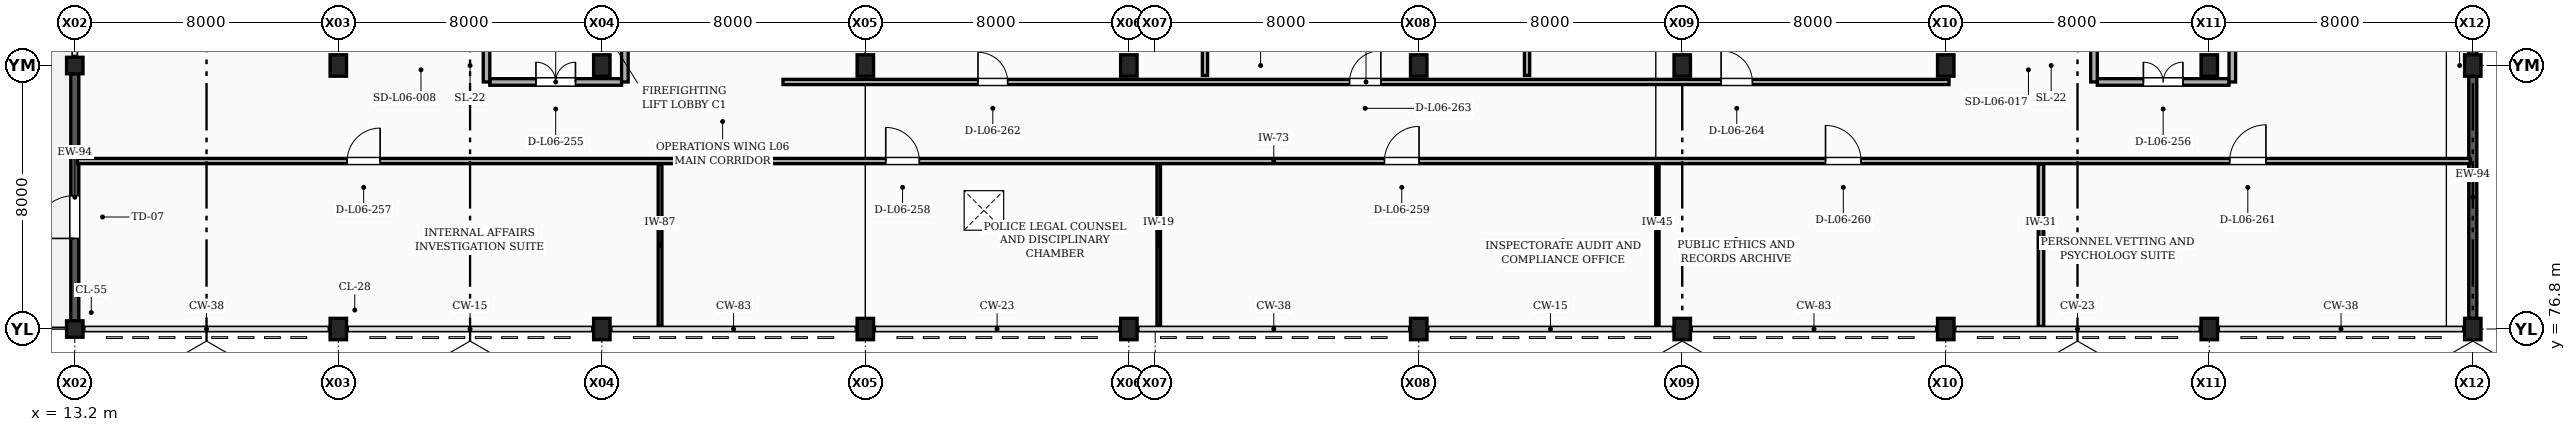
"""IFC4 building model, lengths in metres.
Left out: names, types, materials, properties, quantities, classifications, styles, units other than length and angle.
Written with IfcOpenShell. Run it as: python <this file> out.ifc"""

import sys

from ifc_helpers import new_model, si_unit, direction, frame, frame_2d, origin, origin_2d, place, context, subcontext, project, spatial, rectangle, extrude, element, fill, save


model = new_model("IFC4")
c1 = context("Model", 3, precision=1e-05, world=origin(), true_north=direction((0.0, 1.0)))
c2 = subcontext(c1, "Body", "Model", "MODEL_VIEW")
j1 = project(units=[si_unit("LENGTHUNIT", "METRE"), si_unit("PLANEANGLEUNIT", "RADIAN")], contexts=[c1])
p1 = place(None, origin())
s1 = spatial("IfcSite", under=j1, at=p1, CompositionType="ELEMENT")
p2 = place(p1, origin())
s2 = spatial("IfcBuilding", under=s1, at=p2, CompositionType="ELEMENT")
p3 = place(p2, frame((0.0, 0.0, 25.8)))
s3 = spatial("IfcBuildingStorey", under=s2, at=p3, CompositionType="ELEMENT", Elevation=25.8)
for number, where, z_axis, x_axis in (
    (1, (13.2, 76.8, 0.0), (0.0, 0.0, 1.0), (1.0, 0.0, 0.0)),
    (2, (13.2, 84.8, 0.0), (0.0, 0.0, 1.0), (1.0, 0.0, 0.0)),
):
    element("IfcColumn", number, at=place(p3, frame(where, z_axis=z_axis, x_axis=x_axis)), inside=s3, PredefinedType="COLUMN", context=c2, shape_type="SweptSolid", body=[
        extrude(rectangle(XDim=0.5, YDim=0.5, at=origin_2d()), origin(), (0.0, 0.0, 1.0), 3.9),
    ])
for number, where, z_axis, x_axis in (
    (3, (21.2, 76.8, 0.0), (0.0, 0.0, 1.0), (1.0, 0.0, 0.0)),
    (4, (21.2, 84.8, 0.0), (0.0, 0.0, 1.0), (1.0, 0.0, 0.0)),
    (5, (29.2, 76.8, 0.0), (0.0, 0.0, 1.0), (1.0, 0.0, 0.0)),
    (6, (29.2, 84.8, 0.0), (0.0, 0.0, 1.0), (1.0, 0.0, 0.0)),
    (7, (37.2, 76.8, 0.0), (0.0, 0.0, 1.0), (1.0, 0.0, 0.0)),
    (8, (37.2, 84.8, 0.0), (0.0, 0.0, 1.0), (1.0, 0.0, 0.0)),
    (9, (45.2, 76.8, 0.0), (0.0, 0.0, 1.0), (1.0, 0.0, 0.0)),
    (10, (45.2, 84.8, 0.0), (0.0, 0.0, 1.0), (1.0, 0.0, 0.0)),
    (11, (54.0, 76.8, 0.0), (0.0, 0.0, 1.0), (1.0, 0.0, 0.0)),
    (12, (54.0, 84.8, 0.0), (0.0, 0.0, 1.0), (1.0, 0.0, 0.0)),
    (13, (62.0, 76.8, 0.0), (0.0, 0.0, 1.0), (1.0, 0.0, 0.0)),
    (14, (62.0, 84.8, 0.0), (0.0, 0.0, 1.0), (1.0, 0.0, 0.0)),
    (15, (70.0, 76.8, 0.0), (0.0, 0.0, 1.0), (1.0, 0.0, 0.0)),
    (16, (70.0, 84.8, 0.0), (0.0, 0.0, 1.0), (1.0, 0.0, 0.0)),
    (17, (78.0, 76.8, 0.0), (0.0, 0.0, 1.0), (1.0, 0.0, 0.0)),
    (18, (78.0, 84.8, 0.0), (0.0, 0.0, 1.0), (1.0, 0.0, 0.0)),
    (19, (86.0, 76.8, 0.0), (0.0, 0.0, 1.0), (1.0, 0.0, 0.0)),
    (20, (86.0, 84.8, 0.0), (0.0, 0.0, 1.0), (1.0, 0.0, 0.0)),
):
    element("IfcColumn", number, at=place(p3, frame(where, z_axis=z_axis, x_axis=x_axis)), inside=s3, PredefinedType="COLUMN", context=c2, shape_type="SweptSolid", body=[
        extrude(rectangle(XDim=0.5, YDim=0.65, at=origin_2d()), origin(), (0.0, 0.0, 1.0), 3.9),
    ])
p4 = place(p3, frame((86.0, 77.125, 0.0), z_axis=(0.0, 0.0, 1.0), x_axis=(0.0, 1.0, 0.0)))
e21 = element("IfcWall", 21, at=p4, inside=s3, PredefinedType="SOLIDWALL", context=c2, shape_type="SweptSolid", body=[
    extrude(rectangle(XDim=7.35, YDim=0.245, at=frame_2d((3.675, 0.0))), origin(), (0.0, 0.0, 1.0), 3.01),
])
p5 = place(p3, frame((86.0, 85.125, 0.0), z_axis=(0.0, 0.0, 1.0), x_axis=(0.0, 1.0, 0.0)))
e22 = element("IfcWall", 22, at=p5, inside=s3, PredefinedType="SOLIDWALL", context=c2, shape_type="SweptSolid", body=[
    extrude(rectangle(XDim=7.35, YDim=0.245, at=frame_2d((3.675, 0.0))), origin(), (0.0, 0.0, 1.0), 3.01),
])
p6 = place(p5, frame((2.475, 0.0, 0.9)))
e23 = element("IfcOpeningElement", 23, at=p6, cuts=e22, PredefinedType="OPENING", context=c2, shape_type="SweptSolid", body=[
    extrude(rectangle(XDim=2.4, YDim=1.5, at=frame_2d((1.2, 0.75))), frame((0.0, 0.133, 0.0), z_axis=(0.0, -1.0, 0.0), x_axis=(1.0, 0.0, 0.0)), (0.0, 0.0, 1.0), 0.265),
])
p7 = place(p3, frame((13.2, 84.55, 0.0), z_axis=(0.0, 0.0, 1.0), x_axis=(0.0, -1.0, 0.0)))
e24 = element("IfcWall", 24, at=p7, inside=s3, PredefinedType="SOLIDWALL", context=c2, shape_type="SweptSolid", body=[
    extrude(rectangle(XDim=7.5, YDim=0.245, at=frame_2d((3.75, 0.0))), origin(), (0.0, 0.0, 1.0), 3.01),
])
p8 = place(p7, frame((3.7, 0.0, 0.0)))
e25 = element("IfcOpeningElement", 25, at=p8, cuts=e24, PredefinedType="OPENING", context=c2, shape_type="SweptSolid", body=[
    extrude(rectangle(XDim=1.3, YDim=2.2, at=frame_2d((0.65, 1.1))), frame((0.0, 0.133, 0.0), z_axis=(0.0, -1.0, 0.0), x_axis=(1.0, 0.0, 0.0)), (0.0, 0.0, 1.0), 0.265),
])
p9 = place(p3, frame((25.8, 84.3, 0.0), z_axis=(0.0, 0.0, 1.0), x_axis=(1.0, 0.0, 0.0)))
e26 = element("IfcWall", 26, at=p9, inside=s3, PredefinedType="PARTITIONING", context=c2, shape_type="SweptSolid", body=[
    extrude(rectangle(XDim=4.0, YDim=0.2, at=frame_2d((2.0, 0.0))), origin(), (0.0, 0.0, 1.0), 2.895),
])
p10 = place(p9, frame((1.4, 0.0, 0.0)))
e27 = element("IfcOpeningElement", 27, at=p10, cuts=e26, PredefinedType="OPENING", context=c2, shape_type="SweptSolid", body=[
    extrude(rectangle(XDim=1.2, YDim=2.15, at=frame_2d((0.6, 1.075))), frame((0.0, 0.11, 0.0), z_axis=(0.0, -1.0, 0.0), x_axis=(1.0, 0.0, 0.0)), (0.0, 0.0, 1.0), 0.22),
])
p11 = place(p3, frame((25.7, 84.3, 0.0), z_axis=(0.0, 0.0, 1.0), x_axis=(0.0, 1.0, 0.0)))
e28 = element("IfcWall", 28, at=p11, inside=s3, PredefinedType="PARTITIONING", context=c2, shape_type="SweptSolid", body=[
    extrude(rectangle(XDim=4.8, YDim=0.2, at=frame_2d((2.4, 0.0))), origin(), (0.0, 0.0, 1.0), 3.045),
])
p12 = place(p3, frame((29.9, 84.3, 0.0), z_axis=(0.0, 0.0, 1.0), x_axis=(0.0, 1.0, 0.0)))
e29 = element("IfcWall", 29, at=p12, inside=s3, PredefinedType="PARTITIONING", context=c2, shape_type="SweptSolid", body=[
    extrude(rectangle(XDim=4.8, YDim=0.2, at=frame_2d((2.4, 0.0))), origin(), (0.0, 0.0, 1.0), 3.095),
])
p13 = place(p3, frame((74.6, 84.3, 0.0), z_axis=(0.0, 0.0, 1.0), x_axis=(1.0, 0.0, 0.0)))
e30 = element("IfcWall", 30, at=p13, inside=s3, PredefinedType="PARTITIONING", context=c2, shape_type="SweptSolid", body=[
    extrude(rectangle(XDim=4.0, YDim=0.2, at=frame_2d((2.0, 0.0))), origin(), (0.0, 0.0, 1.0), 2.895),
])
p14 = place(p13, frame((1.4, 0.0, 0.0)))
e31 = element("IfcOpeningElement", 31, at=p14, cuts=e30, PredefinedType="OPENING", context=c2, shape_type="SweptSolid", body=[
    extrude(rectangle(XDim=1.2, YDim=2.15, at=frame_2d((0.6, 1.075))), frame((0.0, 0.11, 0.0), z_axis=(0.0, -1.0, 0.0), x_axis=(1.0, 0.0, 0.0)), (0.0, 0.0, 1.0), 0.22),
])
p15 = place(p3, frame((74.5, 84.3, 0.0), z_axis=(0.0, 0.0, 1.0), x_axis=(0.0, 1.0, 0.0)))
e32 = element("IfcWall", 32, at=p15, inside=s3, PredefinedType="PARTITIONING", context=c2, shape_type="SweptSolid", body=[
    extrude(rectangle(XDim=4.8, YDim=0.2, at=frame_2d((2.4, 0.0))), origin(), (0.0, 0.0, 1.0), 3.045),
])
p16 = place(p3, frame((78.7, 84.3, 0.0), z_axis=(0.0, 0.0, 1.0), x_axis=(0.0, 1.0, 0.0)))
e33 = element("IfcWall", 33, at=p16, inside=s3, PredefinedType="PARTITIONING", context=c2, shape_type="SweptSolid", body=[
    extrude(rectangle(XDim=4.8, YDim=0.2, at=frame_2d((2.4, 0.0))), origin(), (0.0, 0.0, 1.0), 3.095),
])
p17 = place(p3, frame((30.968, 76.88, 0.0), z_axis=(0.0, 0.0, 1.0), x_axis=(0.0, 1.0, 0.0)))
e34 = element("IfcWall", 34, at=p17, inside=s3, PredefinedType="PARTITIONING", context=c2, shape_type="SweptSolid", body=[
    extrude(rectangle(XDim=4.92, YDim=0.115, at=frame_2d((2.46, 0.0))), origin(), (0.0, 0.0, 1.0), 3.66),
])
p18 = place(p3, frame((46.107, 76.88, 0.0), z_axis=(0.0, 0.0, 1.0), x_axis=(0.0, 1.0, 0.0)))
e35 = element("IfcWall", 35, at=p18, inside=s3, PredefinedType="PARTITIONING", context=c2, shape_type="SweptSolid", body=[
    extrude(rectangle(XDim=4.92, YDim=0.108, at=frame_2d((2.46, 0.0))), origin(), (0.0, 0.0, 1.0), 3.66),
])
p19 = place(p3, frame((61.246, 76.88, 0.0), z_axis=(0.0, 0.0, 1.0), x_axis=(0.0, 1.0, 0.0)))
e36 = element("IfcWall", 36, at=p19, inside=s3, PredefinedType="PARTITIONING", context=c2, shape_type="SweptSolid", body=[
    extrude(rectangle(XDim=4.92, YDim=0.1, at=frame_2d((2.46, 0.0))), origin(), (0.0, 0.0, 1.0), 3.66),
])
p20 = place(p3, frame((72.891, 76.88, 0.0), z_axis=(0.0, 0.0, 1.0), x_axis=(0.0, 1.0, 0.0)))
e37 = element("IfcWall", 37, at=p20, inside=s3, PredefinedType="PARTITIONING", context=c2, shape_type="SweptSolid", body=[
    extrude(rectangle(XDim=4.92, YDim=0.168, at=frame_2d((2.46, 0.0))), origin(), (0.0, 0.0, 1.0), 2.995),
])
p21 = place(p3, frame((13.28, 81.9, 0.0), z_axis=(0.0, 0.0, 1.0), x_axis=(1.0, 0.0, 0.0)))
e38 = element("IfcWall", 38, at=p21, inside=s3, PredefinedType="PARTITIONING", context=c2, shape_type="SweptSolid", body=[
    extrude(rectangle(XDim=72.64, YDim=0.16, at=frame_2d((36.32, 0.0))), origin(), (0.0, 0.0, 1.0), 2.895),
])
p22 = place(p21, frame((8.19, 0.0, 0.0)))
e39 = element("IfcOpeningElement", 39, at=p22, cuts=e38, PredefinedType="OPENING", context=c2, shape_type="SweptSolid", body=[
    extrude(rectangle(XDim=1.0, YDim=2.1, at=frame_2d((0.5, 1.05))), frame((0.0, 0.09, 0.0), z_axis=(0.0, -1.0, 0.0), x_axis=(1.0, 0.0, 0.0)), (0.0, 0.0, 1.0), 0.18),
])
p23 = place(p21, frame((24.54, 0.0, 0.0)))
e40 = element("IfcOpeningElement", 40, at=p23, cuts=e38, PredefinedType="OPENING", context=c2, shape_type="SweptSolid", body=[
    extrude(rectangle(XDim=1.02, YDim=2.12, at=frame_2d((0.51, 1.06))), frame((0.0, 0.09, 0.0), z_axis=(0.0, -1.0, 0.0), x_axis=(1.0, 0.0, 0.0)), (0.0, 0.0, 1.0), 0.18),
])
p24 = place(p21, frame((39.68, 0.0, 0.0)))
e41 = element("IfcOpeningElement", 41, at=p24, cuts=e38, PredefinedType="OPENING", context=c2, shape_type="SweptSolid", body=[
    extrude(rectangle(XDim=1.05, YDim=2.1, at=frame_2d((0.525, 1.05))), frame((0.0, 0.09, 0.0), z_axis=(0.0, -1.0, 0.0), x_axis=(1.0, 0.0, 0.0)), (0.0, 0.0, 1.0), 0.18),
])
p25 = place(p21, frame((53.07, 0.0, 0.0)))
e42 = element("IfcOpeningElement", 42, at=p25, cuts=e38, PredefinedType="OPENING", context=c2, shape_type="SweptSolid", body=[
    extrude(rectangle(XDim=1.08, YDim=2.14, at=frame_2d((0.54, 1.07))), frame((0.0, 0.09, 0.0), z_axis=(0.0, -1.0, 0.0), x_axis=(1.0, 0.0, 0.0)), (0.0, 0.0, 1.0), 0.18),
])
p26 = place(p21, frame((65.34, 0.0, 0.0)))
e43 = element("IfcOpeningElement", 43, at=p26, cuts=e38, PredefinedType="OPENING", context=c2, shape_type="SweptSolid", body=[
    extrude(rectangle(XDim=1.1, YDim=2.1, at=frame_2d((0.55, 1.05))), frame((0.0, 0.09, 0.0), z_axis=(0.0, -1.0, 0.0), x_axis=(1.0, 0.0, 0.0)), (0.0, 0.0, 1.0), 0.18),
])
p27 = place(p3, frame((47.511, 84.5, 0.0), z_axis=(0.0, 0.0, 1.0), x_axis=(0.0, 1.0, 0.0)))
e44 = element("IfcWall", 44, at=p27, inside=s3, PredefinedType="PARTITIONING", context=c2, shape_type="SweptSolid", body=[
    extrude(rectangle(XDim=8.22, YDim=0.16, at=frame_2d((4.11, 0.0))), origin(), (0.0, 0.0, 1.0), 2.895),
])
p28 = place(p3, frame((57.289, 84.5, 0.0), z_axis=(0.0, 0.0, 1.0), x_axis=(0.0, 1.0, 0.0)))
e45 = element("IfcWall", 45, at=p28, inside=s3, PredefinedType="PARTITIONING", context=c2, shape_type="SweptSolid", body=[
    extrude(rectangle(XDim=8.22, YDim=0.16, at=frame_2d((4.11, 0.0))), origin(), (0.0, 0.0, 1.0), 2.945),
])
p29 = place(p3, frame((34.7, 84.3, 0.0), z_axis=(0.0, 0.0, 1.0), x_axis=(1.0, 0.0, 0.0)))
e46 = element("IfcWall", 46, at=p29, inside=s3, PredefinedType="PARTITIONING", context=c2, shape_type="SweptSolid", body=[
    extrude(rectangle(XDim=35.4, YDim=0.16, at=frame_2d((17.7, 0.0))), origin(), (0.0, 0.0, 1.0), 2.895),
])
p30 = place(p29, frame((5.92, 0.0, 0.0)))
e47 = element("IfcOpeningElement", 47, at=p30, cuts=e46, PredefinedType="OPENING", context=c2, shape_type="SweptSolid", body=[
    extrude(rectangle(XDim=0.9, YDim=2.1, at=frame_2d((0.45, 1.05))), frame((0.0, 0.09, 0.0), z_axis=(0.0, -1.0, 0.0), x_axis=(1.0, 0.0, 0.0)), (0.0, 0.0, 1.0), 0.18),
])
p31 = place(p29, frame((17.2, 0.0, 0.0)))
e48 = element("IfcOpeningElement", 48, at=p31, cuts=e46, PredefinedType="OPENING", context=c2, shape_type="SweptSolid", body=[
    extrude(rectangle(XDim=0.95, YDim=2.15, at=frame_2d((0.475, 1.075))), frame((0.0, 0.09, 0.0), z_axis=(0.0, -1.0, 0.0), x_axis=(1.0, 0.0, 0.0)), (0.0, 0.0, 1.0), 0.18),
])
p32 = place(p29, frame((28.48, 0.0, 0.0)))
e49 = element("IfcOpeningElement", 49, at=p32, cuts=e46, PredefinedType="OPENING", context=c2, shape_type="SweptSolid", body=[
    extrude(rectangle(XDim=0.95, YDim=2.1, at=frame_2d((0.475, 1.05))), frame((0.0, 0.09, 0.0), z_axis=(0.0, -1.0, 0.0), x_axis=(1.0, 0.0, 0.0)), (0.0, 0.0, 1.0), 0.18),
])
p33 = place(p8, frame((1.3, 0.0, 0.0), z_axis=(0.0, 0.0, 1.0), x_axis=(-1.0, 0.0, 0.0)))
e50 = element("IfcDoor", 50, at=p33, inside=s3, OperationType="SINGLE_SWING_LEFT", PredefinedType="DOOR", context=c2, shape_type="SweptSolid", body=[
    extrude(rectangle(XDim=1.3, YDim=2.2, at=frame_2d((0.65, 1.1))), frame((0.0, 0.025, 0.0), z_axis=(0.0, -1.0, 0.0), x_axis=(1.0, 0.0, 0.0)), (0.0, 0.0, 1.0), 0.05),
])
fill(e25, e50)
p34 = place(p10, origin())
e51 = element("IfcDoor", 51, at=p34, inside=s3, OperationType="DOUBLE_DOOR_SINGLE_SWING", PredefinedType="DOOR", context=c2, shape_type="SweptSolid", body=[
    extrude(rectangle(XDim=1.2, YDim=2.15, at=frame_2d((0.6, 1.075))), frame((0.0, 0.025, 0.0), z_axis=(0.0, -1.0, 0.0), x_axis=(1.0, 0.0, 0.0)), (0.0, 0.0, 1.0), 0.05),
])
fill(e27, e51)
p35 = place(p14, origin())
e52 = element("IfcDoor", 52, at=p35, inside=s3, OperationType="DOUBLE_DOOR_SINGLE_SWING", PredefinedType="DOOR", context=c2, shape_type="SweptSolid", body=[
    extrude(rectangle(XDim=1.2, YDim=2.15, at=frame_2d((0.6, 1.075))), frame((0.0, 0.025, 0.0), z_axis=(0.0, -1.0, 0.0), x_axis=(1.0, 0.0, 0.0)), (0.0, 0.0, 1.0), 0.05),
])
fill(e31, e52)
p36 = place(p22, origin())
e53 = element("IfcDoor", 53, at=p36, inside=s3, OperationType="SINGLE_SWING_RIGHT", PredefinedType="DOOR", context=c2, shape_type="SweptSolid", body=[
    extrude(rectangle(XDim=1.0, YDim=2.1, at=frame_2d((0.5, 1.05))), frame((0.0, 0.025, 0.0), z_axis=(0.0, -1.0, 0.0), x_axis=(1.0, 0.0, 0.0)), (0.0, 0.0, 1.0), 0.05),
])
fill(e39, e53)
p37 = place(p23, origin())
e54 = element("IfcDoor", 54, at=p37, inside=s3, OperationType="SINGLE_SWING_LEFT", PredefinedType="DOOR", context=c2, shape_type="SweptSolid", body=[
    extrude(rectangle(XDim=1.02, YDim=2.12, at=frame_2d((0.51, 1.06))), frame((0.0, 0.025, 0.0), z_axis=(0.0, -1.0, 0.0), x_axis=(1.0, 0.0, 0.0)), (0.0, 0.0, 1.0), 0.05),
])
fill(e40, e54)
p38 = place(p24, origin())
e55 = element("IfcDoor", 55, at=p38, inside=s3, OperationType="SINGLE_SWING_RIGHT", PredefinedType="DOOR", context=c2, shape_type="SweptSolid", body=[
    extrude(rectangle(XDim=1.05, YDim=2.1, at=frame_2d((0.525, 1.05))), frame((0.0, 0.025, 0.0), z_axis=(0.0, -1.0, 0.0), x_axis=(1.0, 0.0, 0.0)), (0.0, 0.0, 1.0), 0.05),
])
fill(e41, e55)
p39 = place(p25, origin())
e56 = element("IfcDoor", 56, at=p39, inside=s3, OperationType="SINGLE_SWING_LEFT", PredefinedType="DOOR", context=c2, shape_type="SweptSolid", body=[
    extrude(rectangle(XDim=1.08, YDim=2.14, at=frame_2d((0.54, 1.07))), frame((0.0, 0.025, 0.0), z_axis=(0.0, -1.0, 0.0), x_axis=(1.0, 0.0, 0.0)), (0.0, 0.0, 1.0), 0.05),
])
fill(e42, e56)
p40 = place(p26, origin())
e57 = element("IfcDoor", 57, at=p40, inside=s3, OperationType="SINGLE_SWING_RIGHT", PredefinedType="DOOR", context=c2, shape_type="SweptSolid", body=[
    extrude(rectangle(XDim=1.1, YDim=2.1, at=frame_2d((0.55, 1.05))), frame((0.0, 0.025, 0.0), z_axis=(0.0, -1.0, 0.0), x_axis=(1.0, 0.0, 0.0)), (0.0, 0.0, 1.0), 0.05),
])
fill(e43, e57)
p41 = place(p30, origin())
e58 = element("IfcDoor", 58, at=p41, inside=s3, OperationType="SINGLE_SWING_LEFT", PredefinedType="DOOR", context=c2, shape_type="SweptSolid", body=[
    extrude(rectangle(XDim=0.9, YDim=2.1, at=frame_2d((0.45, 1.05))), frame((0.0, 0.025, 0.0), z_axis=(0.0, -1.0, 0.0), x_axis=(1.0, 0.0, 0.0)), (0.0, 0.0, 1.0), 0.05),
])
fill(e47, e58)
p42 = place(p31, origin())
e59 = element("IfcDoor", 59, at=p42, inside=s3, OperationType="SINGLE_SWING_RIGHT", PredefinedType="DOOR", context=c2, shape_type="SweptSolid", body=[
    extrude(rectangle(XDim=0.95, YDim=2.15, at=frame_2d((0.475, 1.075))), frame((0.0, 0.025, 0.0), z_axis=(0.0, -1.0, 0.0), x_axis=(1.0, 0.0, 0.0)), (0.0, 0.0, 1.0), 0.05),
])
fill(e48, e59)
p43 = place(p32, origin())
e60 = element("IfcDoor", 60, at=p43, inside=s3, OperationType="SINGLE_SWING_LEFT", PredefinedType="DOOR", context=c2, shape_type="SweptSolid", body=[
    extrude(rectangle(XDim=0.95, YDim=2.1, at=frame_2d((0.475, 1.05))), frame((0.0, 0.025, 0.0), z_axis=(0.0, -1.0, 0.0), x_axis=(1.0, 0.0, 0.0)), (0.0, 0.0, 1.0), 0.05),
])
fill(e49, e60)
save(model, sys.argv[1])
